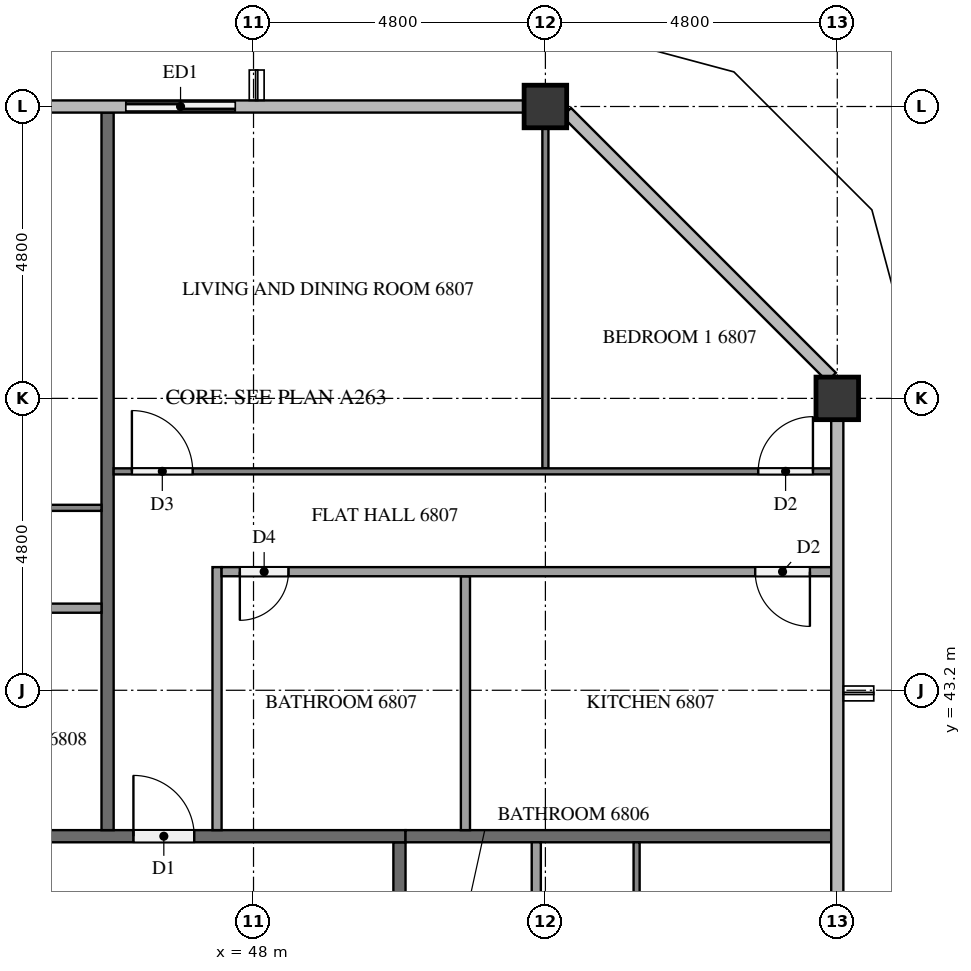
"""IFC4 building model, lengths in metres.
Left out: names, types, materials, properties, quantities, classifications, styles, units other than length and angle.
Written with IfcOpenShell. Run it as: python <this file> out.ifc"""

import sys

from ifc_helpers import new_model, si_unit, direction, frame, frame_2d, origin, origin_2d, place, context, subcontext, project, spatial, rectangle, extrude, element, fill, save


model = new_model("IFC4")
c1 = context("Model", 3, precision=1e-05, world=origin(), true_north=direction((0.0, 1.0)))
c2 = subcontext(c1, "Body", "Model", "MODEL_VIEW")
j1 = project(units=[si_unit("LENGTHUNIT", "METRE"), si_unit("PLANEANGLEUNIT", "RADIAN")], contexts=[c1])
p1 = place(None, origin())
s1 = spatial("IfcSite", under=j1, at=p1, CompositionType="ELEMENT")
p2 = place(p1, origin())
s2 = spatial("IfcBuilding", under=s1, at=p2, CompositionType="ELEMENT")
p3 = place(p2, frame((0.0, 0.0, 259.7)))
s3 = spatial("IfcBuildingStorey", under=s2, at=p3, CompositionType="ELEMENT", Elevation=259.7)
for number, where, z_axis, x_axis in (
    (1, (57.6, 48.0, 0.0), (0.0, 0.0, 1.0), (1.0, 0.0, 0.0)),
    (2, (52.8, 52.8, 0.0), (0.0, 0.0, 1.0), (1.0, 0.0, 0.0)),
):
    element("IfcColumn", number, at=place(p3, frame(where, z_axis=z_axis, x_axis=x_axis)), inside=s3, PredefinedType="COLUMN", context=c2, shape_type="SweptSolid", body=[
        extrude(rectangle(XDim=0.7, YDim=0.7, at=origin_2d()), origin(), (0.0, 0.0, 1.0), 3.1),
    ])
p4 = place(p3, frame((48.0, 52.8, 0.0), z_axis=(0.0, 0.0, 1.0), x_axis=(-1.0, 0.0, 0.0)))
e3 = element("IfcWall", 3, at=p4, inside=s3, PredefinedType="SOLIDWALL", context=c2, shape_type="SweptSolid", body=[
    extrude(rectangle(XDim=2.4, YDim=0.15, at=frame_2d((1.2, 0.0))), origin(), (0.0, 0.0, 1.0), 3.1),
])
p5 = place(p4, frame((0.3, 0.0, 0.0)))
e4 = element("IfcOpeningElement", 4, at=p5, cuts=e3, PredefinedType="OPENING", context=c2, shape_type="SweptSolid", body=[
    extrude(rectangle(XDim=1.8, YDim=2.4, at=frame_2d((0.9, 1.2))), frame((0.0, 0.085, 0.0), z_axis=(0.0, -1.0, 0.0), x_axis=(1.0, 0.0, 0.0)), (0.0, 0.0, 1.0), 0.17),
])
p6 = place(p3, frame((50.4, 40.7, 0.0), z_axis=(0.0, 0.0, 1.0), x_axis=(0.0, -1.0, 0.0)))
e5 = element("IfcWall", 5, at=p6, inside=s3, PredefinedType="PARTITIONING", context=c2, shape_type="SweptSolid", body=[
    extrude(rectangle(XDim=28.6, YDim=0.2, at=frame_2d((14.3, 0.0))), origin(), (0.0, 0.0, 1.0), 3.1),
])
p7 = place(p6, frame((27.275, 0.0, 0.0)))
e6 = element("IfcOpeningElement", 6, at=p7, cuts=e5, PredefinedType="OPENING", context=c2, shape_type="SweptSolid", body=[
    extrude(rectangle(XDim=1.0, YDim=2.1, at=frame_2d((0.5, 1.05))), frame((0.0, 0.11, 0.0), z_axis=(0.0, -1.0, 0.0), x_axis=(1.0, 0.0, 0.0)), (0.0, 0.0, 1.0), 0.22),
])
p8 = place(p6, frame((7.525, 0.0, 0.0)))
e7 = element("IfcOpeningElement", 7, at=p8, cuts=e5, PredefinedType="OPENING", context=c2, shape_type="SweptSolid", body=[
    extrude(rectangle(XDim=1.0, YDim=2.1, at=frame_2d((0.5, 1.05))), frame((0.0, 0.11, 0.0), z_axis=(0.0, -1.0, 0.0), x_axis=(1.0, 0.0, 0.0)), (0.0, 0.0, 1.0), 0.22),
])
p9 = place(p6, frame((5.675, 0.0, 0.0)))
e8 = element("IfcOpeningElement", 8, at=p9, cuts=e5, PredefinedType="OPENING", context=c2, shape_type="SweptSolid", body=[
    extrude(rectangle(XDim=1.0, YDim=2.1, at=frame_2d((0.5, 1.05))), frame((0.0, 0.11, 0.0), z_axis=(0.0, -1.0, 0.0), x_axis=(1.0, 0.0, 0.0)), (0.0, 0.0, 1.0), 0.22),
])
p10 = place(p3, frame((11.9, 40.8, 0.0), z_axis=(0.0, 0.0, 1.0), x_axis=(1.0, 0.0, 0.0)))
e9 = element("IfcWall", 9, at=p10, inside=s3, PredefinedType="PARTITIONING", context=c2, shape_type="SweptSolid", body=[
    extrude(rectangle(XDim=38.6, YDim=0.2, at=frame_2d((19.3, 0.0))), origin(), (0.0, 0.0, 1.0), 3.1),
])
p11 = place(p10, frame((34.125, 0.0, 0.0)))
e10 = element("IfcOpeningElement", 10, at=p11, cuts=e9, PredefinedType="OPENING", context=c2, shape_type="SweptSolid", body=[
    extrude(rectangle(XDim=1.0, YDim=2.1, at=frame_2d((0.5, 1.05))), frame((0.0, 0.11, 0.0), z_axis=(0.0, -1.0, 0.0), x_axis=(1.0, 0.0, 0.0)), (0.0, 0.0, 1.0), 0.22),
])
p12 = place(p10, frame((24.525, 0.0, 0.0)))
e11 = element("IfcOpeningElement", 11, at=p12, cuts=e9, PredefinedType="OPENING", context=c2, shape_type="SweptSolid", body=[
    extrude(rectangle(XDim=1.0, YDim=2.1, at=frame_2d((0.5, 1.05))), frame((0.0, 0.11, 0.0), z_axis=(0.0, -1.0, 0.0), x_axis=(1.0, 0.0, 0.0)), (0.0, 0.0, 1.0), 0.22),
])
p13 = place(p10, frame((10.125, 0.0, 0.0)))
e12 = element("IfcOpeningElement", 12, at=p13, cuts=e9, PredefinedType="OPENING", context=c2, shape_type="SweptSolid", body=[
    extrude(rectangle(XDim=1.0, YDim=2.1, at=frame_2d((0.5, 1.05))), frame((0.0, 0.11, 0.0), z_axis=(0.0, -1.0, 0.0), x_axis=(1.0, 0.0, 0.0)), (0.0, 0.0, 1.0), 0.22),
])
p14 = place(p10, frame((8.275, 0.0, 0.0)))
e13 = element("IfcOpeningElement", 13, at=p14, cuts=e9, PredefinedType="OPENING", context=c2, shape_type="SweptSolid", body=[
    extrude(rectangle(XDim=1.0, YDim=2.1, at=frame_2d((0.5, 1.05))), frame((0.0, 0.11, 0.0), z_axis=(0.0, -1.0, 0.0), x_axis=(1.0, 0.0, 0.0)), (0.0, 0.0, 1.0), 0.22),
])
p15 = place(p3, frame((50.5, 40.8, 0.0), z_axis=(0.0, 0.0, 1.0), x_axis=(1.0, 0.0, 0.0)))
e14 = element("IfcWall", 14, at=p15, inside=s3, PredefinedType="PARTITIONING", context=c2, shape_type="SweptSolid", body=[
    extrude(rectangle(XDim=7.0, YDim=0.2, at=frame_2d((3.5, 0.0))), origin(), (0.0, 0.0, 1.0), 3.1),
])
p16 = place(p3, frame((45.6, 52.7, 0.0), z_axis=(0.0, 0.0, 1.0), x_axis=(0.0, -1.0, 0.0)))
e15 = element("IfcWall", 15, at=p16, inside=s3, PredefinedType="PARTITIONING", context=c2, shape_type="SweptSolid", body=[
    extrude(rectangle(XDim=11.8, YDim=0.2, at=frame_2d((5.9, 0.0))), origin(), (0.0, 0.0, 1.0), 3.1),
])
p17 = place(p3, frame((54.3, 40.7, 0.0), z_axis=(0.0, 0.0, 1.0), x_axis=(0.0, -1.0, 0.0)))
e16 = element("IfcWall", 16, at=p17, inside=s3, PredefinedType="PARTITIONING", context=c2, shape_type="SweptSolid", body=[
    extrude(rectangle(XDim=7.0, YDim=0.1, at=frame_2d((3.5, 0.0))), origin(), (0.0, 0.0, 1.0), 3.1),
])
p18 = place(p17, frame((5.7, 0.0, 0.0)))
e17 = element("IfcOpeningElement", 17, at=p18, cuts=e16, PredefinedType="OPENING", context=c2, shape_type="SweptSolid", body=[
    extrude(rectangle(XDim=1.0, YDim=2.1, at=frame_2d((0.5, 1.05))), frame((0.0, 0.06, 0.0), z_axis=(0.0, -1.0, 0.0), x_axis=(1.0, 0.0, 0.0)), (0.0, 0.0, 1.0), 0.12),
])
p19 = place(p3, frame((52.65, 35.475, 0.0), z_axis=(0.0, 0.0, 1.0), x_axis=(0.0, 1.0, 0.0)))
e18 = element("IfcWall", 18, at=p19, inside=s3, PredefinedType="PARTITIONING", context=c2, shape_type="SweptSolid", body=[
    extrude(rectangle(XDim=5.225, YDim=0.15, at=frame_2d((2.612, 0.0))), origin(), (0.0, 0.0, 1.0), 3.1),
])
p20 = place(p19, frame((1.91, 0.0, 0.0)))
e19 = element("IfcOpeningElement", 19, at=p20, cuts=e18, PredefinedType="OPENING", context=c2, shape_type="SweptSolid", body=[
    extrude(rectangle(XDim=0.9, YDim=2.1, at=frame_2d((0.45, 1.05))), frame((0.0, 0.085, 0.0), z_axis=(0.0, -1.0, 0.0), x_axis=(1.0, 0.0, 0.0)), (0.0, 0.0, 1.0), 0.17),
])
p21 = place(p19, frame((3.46, 0.0, 0.0)))
e20 = element("IfcOpeningElement", 20, at=p21, cuts=e18, PredefinedType="OPENING", context=c2, shape_type="SweptSolid", body=[
    extrude(rectangle(XDim=0.8, YDim=2.1, at=frame_2d((0.4, 1.05))), frame((0.0, 0.085, 0.0), z_axis=(0.0, -1.0, 0.0), x_axis=(1.0, 0.0, 0.0)), (0.0, 0.0, 1.0), 0.17),
])
p22 = place(p3, frame((52.8, 46.85, 0.0), z_axis=(0.0, 0.0, 1.0), x_axis=(0.0, 1.0, 0.0)))
e21 = element("IfcWall", 21, at=p22, inside=s3, PredefinedType="PARTITIONING", context=c2, shape_type="SweptSolid", body=[
    extrude(rectangle(XDim=5.6, YDim=0.1, at=frame_2d((2.8, 0.0))), origin(), (0.0, 0.0, 1.0), 3.1),
])
p23 = place(p3, frame((45.7, 46.8, 0.0), z_axis=(0.0, 0.0, 1.0), x_axis=(1.0, 0.0, 0.0)))
e22 = element("IfcWall", 22, at=p23, inside=s3, PredefinedType="PARTITIONING", context=c2, shape_type="SweptSolid", body=[
    extrude(rectangle(XDim=11.8, YDim=0.1, at=frame_2d((5.9, 0.0))), origin(), (0.0, 0.0, 1.0), 3.1),
])
p24 = place(p23, frame((0.3, 0.0, 0.0)))
e23 = element("IfcOpeningElement", 23, at=p24, cuts=e22, PredefinedType="OPENING", context=c2, shape_type="SweptSolid", body=[
    extrude(rectangle(XDim=1.0, YDim=2.1, at=frame_2d((0.5, 1.05))), frame((0.0, 0.06, 0.0), z_axis=(0.0, -1.0, 0.0), x_axis=(1.0, 0.0, 0.0)), (0.0, 0.0, 1.0), 0.12),
])
p25 = place(p23, frame((10.6, 0.0, 0.0)))
e24 = element("IfcOpeningElement", 24, at=p25, cuts=e22, PredefinedType="OPENING", context=c2, shape_type="SweptSolid", body=[
    extrude(rectangle(XDim=0.9, YDim=2.1, at=frame_2d((0.45, 1.05))), frame((0.0, 0.06, 0.0), z_axis=(0.0, -1.0, 0.0), x_axis=(1.0, 0.0, 0.0)), (0.0, 0.0, 1.0), 0.12),
])
p26 = place(p3, frame((51.485, 40.9, 0.0), z_axis=(0.0, 0.0, 1.0), x_axis=(0.0, 1.0, 0.0)))
e25 = element("IfcWall", 25, at=p26, inside=s3, PredefinedType="PARTITIONING", context=c2, shape_type="SweptSolid", body=[
    extrude(rectangle(XDim=4.175, YDim=0.15, at=frame_2d((2.087, 0.0))), origin(), (0.0, 0.0, 1.0), 3.1),
])
p27 = place(p3, frame((47.4, 40.9, 0.0), z_axis=(0.0, 0.0, 1.0), x_axis=(0.0, 1.0, 0.0)))
e26 = element("IfcWall", 26, at=p27, inside=s3, PredefinedType="PARTITIONING", context=c2, shape_type="SweptSolid", body=[
    extrude(rectangle(XDim=4.325, YDim=0.15, at=frame_2d((2.163, 0.0))), origin(), (0.0, 0.0, 1.0), 3.1),
])
p28 = place(p3, frame((57.5, 45.15, 0.0), z_axis=(0.0, 0.0, 1.0), x_axis=(-1.0, 0.0, 0.0)))
e27 = element("IfcWall", 27, at=p28, inside=s3, PredefinedType="PARTITIONING", context=c2, shape_type="SweptSolid", body=[
    extrude(rectangle(XDim=10.025, YDim=0.15, at=frame_2d((5.012, 0.0))), origin(), (0.0, 0.0, 1.0), 3.1),
])
p29 = place(p28, frame((8.925, 0.0, 0.0)))
e28 = element("IfcOpeningElement", 28, at=p29, cuts=e27, PredefinedType="OPENING", context=c2, shape_type="SweptSolid", body=[
    extrude(rectangle(XDim=0.8, YDim=2.1, at=frame_2d((0.4, 1.05))), frame((0.0, 0.085, 0.0), z_axis=(0.0, -1.0, 0.0), x_axis=(1.0, 0.0, 0.0)), (0.0, 0.0, 1.0), 0.17),
])
p30 = place(p28, frame((0.35, 0.0, 0.0)))
e29 = element("IfcOpeningElement", 29, at=p30, cuts=e27, PredefinedType="OPENING", context=c2, shape_type="SweptSolid", body=[
    extrude(rectangle(XDim=0.9, YDim=2.1, at=frame_2d((0.45, 1.05))), frame((0.0, 0.085, 0.0), z_axis=(0.0, -1.0, 0.0), x_axis=(1.0, 0.0, 0.0)), (0.0, 0.0, 1.0), 0.17),
])
p31 = place(p3, frame((36.1, 46.2, 0.0), z_axis=(0.0, 0.0, 1.0), x_axis=(1.0, 0.0, 0.0)))
e30 = element("IfcWall", 30, at=p31, inside=s3, PredefinedType="PARTITIONING", context=c2, shape_type="SweptSolid", body=[
    extrude(rectangle(XDim=9.4, YDim=0.1, at=frame_2d((4.7, 0.0))), origin(), (0.0, 0.0, 1.0), 3.1),
])
p32 = place(p31, frame((3.45, 0.0, 0.0)))
e31 = element("IfcOpeningElement", 31, at=p32, cuts=e30, PredefinedType="OPENING", context=c2, shape_type="SweptSolid", body=[
    extrude(rectangle(XDim=0.9, YDim=2.1, at=frame_2d((0.45, 1.05))), frame((0.0, 0.06, 0.0), z_axis=(0.0, -1.0, 0.0), x_axis=(1.0, 0.0, 0.0)), (0.0, 0.0, 1.0), 0.12),
])
p33 = place(p31, frame((5.05, 0.0, 0.0)))
e32 = element("IfcOpeningElement", 32, at=p33, cuts=e30, PredefinedType="OPENING", context=c2, shape_type="SweptSolid", body=[
    extrude(rectangle(XDim=1.0, YDim=2.1, at=frame_2d((0.5, 1.05))), frame((0.0, 0.06, 0.0), z_axis=(0.0, -1.0, 0.0), x_axis=(1.0, 0.0, 0.0)), (0.0, 0.0, 1.0), 0.12),
])
p34 = place(p3, frame((45.5, 44.55, 0.0), z_axis=(0.0, 0.0, 1.0), x_axis=(-1.0, 0.0, 0.0)))
e33 = element("IfcWall", 33, at=p34, inside=s3, PredefinedType="PARTITIONING", context=c2, shape_type="SweptSolid", body=[
    extrude(rectangle(XDim=7.625, YDim=0.15, at=frame_2d((3.812, 0.0))), origin(), (0.0, 0.0, 1.0), 3.1),
])
p35 = place(p34, frame((3.375, 0.0, 0.0)))
e34 = element("IfcOpeningElement", 34, at=p35, cuts=e33, PredefinedType="OPENING", context=c2, shape_type="SweptSolid", body=[
    extrude(rectangle(XDim=0.9, YDim=2.1, at=frame_2d((0.45, 1.05))), frame((0.0, 0.085, 0.0), z_axis=(0.0, -1.0, 0.0), x_axis=(1.0, 0.0, 0.0)), (0.0, 0.0, 1.0), 0.17),
])
p36 = place(p34, frame((1.925, 0.0, 0.0)))
e35 = element("IfcOpeningElement", 35, at=p36, cuts=e33, PredefinedType="OPENING", context=c2, shape_type="SweptSolid", body=[
    extrude(rectangle(XDim=0.8, YDim=2.1, at=frame_2d((0.4, 1.05))), frame((0.0, 0.085, 0.0), z_axis=(0.0, -1.0, 0.0), x_axis=(1.0, 0.0, 0.0)), (0.0, 0.0, 1.0), 0.17),
])
p37 = place(p5, origin())
e36 = element("IfcDoor", 36, at=p37, inside=s3, OperationType="SLIDING_TO_LEFT", PredefinedType="DOOR", context=c2, shape_type="SweptSolid", body=[
    extrude(rectangle(XDim=1.8, YDim=2.4, at=frame_2d((0.9, 1.2))), frame((0.0, 0.025, 0.0), z_axis=(0.0, -1.0, 0.0), x_axis=(1.0, 0.0, 0.0)), (0.0, 0.0, 1.0), 0.05),
])
fill(e4, e36)
p38 = place(p11, origin())
e37 = element("IfcDoor", 37, at=p38, inside=s3, OperationType="SINGLE_SWING_LEFT", PredefinedType="DOOR", context=c2, shape_type="SweptSolid", body=[
    extrude(rectangle(XDim=1.0, YDim=2.1, at=frame_2d((0.5, 1.05))), frame((0.0, 0.025, 0.0), z_axis=(0.0, -1.0, 0.0), x_axis=(1.0, 0.0, 0.0)), (0.0, 0.0, 1.0), 0.05),
])
fill(e10, e37)
p39 = place(p24, origin())
e38 = element("IfcDoor", 38, at=p39, inside=s3, OperationType="SINGLE_SWING_LEFT", PredefinedType="DOOR", context=c2, shape_type="SweptSolid", body=[
    extrude(rectangle(XDim=1.0, YDim=2.1, at=frame_2d((0.5, 1.05))), frame((0.0, 0.025, 0.0), z_axis=(0.0, -1.0, 0.0), x_axis=(1.0, 0.0, 0.0)), (0.0, 0.0, 1.0), 0.05),
])
fill(e23, e38)
p40 = place(p25, origin())
e39 = element("IfcDoor", 39, at=p40, inside=s3, OperationType="SINGLE_SWING_RIGHT", PredefinedType="DOOR", context=c2, shape_type="SweptSolid", body=[
    extrude(rectangle(XDim=0.9, YDim=2.1, at=frame_2d((0.45, 1.05))), frame((0.0, 0.025, 0.0), z_axis=(0.0, -1.0, 0.0), x_axis=(1.0, 0.0, 0.0)), (0.0, 0.0, 1.0), 0.05),
])
fill(e24, e39)
p41 = place(p29, origin())
e40 = element("IfcDoor", 40, at=p41, inside=s3, OperationType="SINGLE_SWING_RIGHT", PredefinedType="DOOR", context=c2, shape_type="SweptSolid", body=[
    extrude(rectangle(XDim=0.8, YDim=2.1, at=frame_2d((0.4, 1.05))), frame((0.0, 0.025, 0.0), z_axis=(0.0, -1.0, 0.0), x_axis=(1.0, 0.0, 0.0)), (0.0, 0.0, 1.0), 0.05),
])
fill(e28, e40)
p42 = place(p30, origin())
e41 = element("IfcDoor", 41, at=p42, inside=s3, OperationType="SINGLE_SWING_LEFT", PredefinedType="DOOR", context=c2, shape_type="SweptSolid", body=[
    extrude(rectangle(XDim=0.9, YDim=2.1, at=frame_2d((0.45, 1.05))), frame((0.0, 0.025, 0.0), z_axis=(0.0, -1.0, 0.0), x_axis=(1.0, 0.0, 0.0)), (0.0, 0.0, 1.0), 0.05),
])
fill(e29, e41)
save(model, sys.argv[1])
